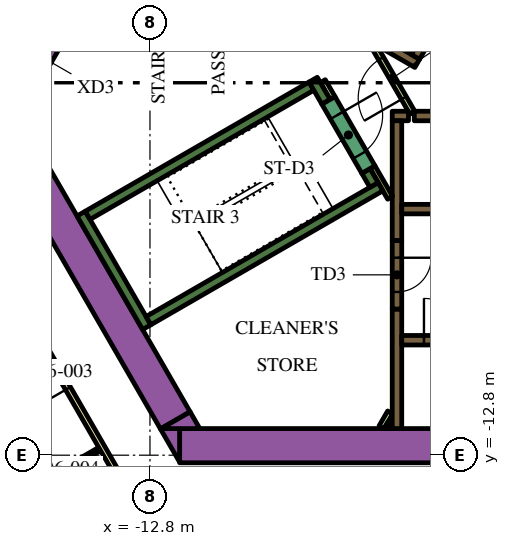
"""IFC4 building model, lengths in metres.
Left out: names, types, materials, properties, quantities, classifications, styles, units other than length and angle.
Written with IfcOpenShell. Run it as: python <this file> out.ifc"""

import sys

from ifc_helpers import new_model, si_unit, direction, frame, frame_2d, origin, place, context, subcontext, project, spatial, polyline, rectangle, outline, extrude, element, fill, save


model = new_model("IFC4")
c1 = context("Model", 3, precision=1e-05, world=origin(), true_north=direction((0.0, 1.0)))
c2 = subcontext(c1, "Body", "Model", "MODEL_VIEW")
j1 = project(units=[si_unit("LENGTHUNIT", "METRE"), si_unit("PLANEANGLEUNIT", "RADIAN")], contexts=[c1])
p1 = place(None, origin())
s1 = spatial("IfcSite", under=j1, at=p1, CompositionType="ELEMENT")
p2 = place(p1, origin())
s2 = spatial("IfcBuilding", under=s1, at=p2, CompositionType="ELEMENT")
p3 = place(p2, frame((0.0, 0.0, 87.6)))
s3 = spatial("IfcBuildingStorey", under=s2, at=p3, CompositionType="ELEMENT", Elevation=87.6)
p4 = place(p3, frame((-12.019, -12.55, 0.0), z_axis=(0.0, 0.0, 1.0), x_axis=(1.0, 0.0, 0.0)))
e1 = element("IfcWall", 1, at=p4, inside=s3, PredefinedType="SOLIDWALL", context=c2, shape_type="SweptSolid", body=[
    extrude(rectangle(XDim=21.63, YDim=0.9, at=frame_2d((10.815, 0.0))), origin(), (0.0, 0.0, 1.0), 3.9),
])
p5 = place(p3, origin())
e2 = element("IfcWall", 2, at=p5, inside=s3, PredefinedType="SOLIDWALL", context=c2, shape_type="SweptSolid", body=[
    extrude(outline(polyline([(-12.529, -12.1), (-12.021, -12.1), (-12.021, -12.98), (-12.529, -12.1)])), origin(), (0.0, 0.0, 1.0), 3.9),
])
p6 = place(p3, frame((-12.134, -11.883, 0.0), z_axis=(0.0, 0.0, 1.0), x_axis=(-0.500005339912, 0.866022320763, 0.0)))
e3 = element("IfcWall", 3, at=p6, inside=s3, PredefinedType="SOLIDWALL", context=c2, shape_type="SweptSolid", body=[
    extrude(rectangle(XDim=9.488, YDim=0.9, at=frame_2d((4.744, 0.0))), origin(), (0.0, 0.0, 1.0), 3.9),
])
e4 = element("IfcWall", 4, at=p5, inside=s3, PredefinedType="SOLIDWALL", context=c2, shape_type="SweptSolid", body=[
    extrude(outline(polyline([(-11.489, -12.1), (-12.505, -12.1), (-11.743, -11.66), (-11.489, -12.1)])), origin(), (0.0, 0.0, 1.0), 3.9),
])
p7 = place(p3, frame((-12.885, -9.431, 0.0), z_axis=(0.0, 0.0, 1.0), x_axis=(-0.500020560727, 0.866013532718, 0.0)))
e5 = element("IfcWall", 5, at=p7, inside=s3, PredefinedType="SOLIDWALL", context=c2, shape_type="SweptSolid", body=[
    extrude(rectangle(XDim=3.45, YDim=0.25, at=frame_2d((1.725, 0.0))), origin(), (0.0, 0.0, 1.0), 3.9),
])
p8 = place(p3, frame((-14.44, -6.49, 0.0), z_axis=(0.0, 0.0, 1.0), x_axis=(0.866022966069, 0.500004222222, 0.0)))
e6 = element("IfcWall", 6, at=p8, inside=s3, PredefinedType="SOLIDWALL", context=c2, shape_type="SweptSolid", body=[
    extrude(rectangle(XDim=6.8, YDim=0.25, at=frame_2d((3.4, 0.0))), origin(), (0.0, 0.0, 1.0), 3.9),
])
p9 = place(p3, frame((-8.168, -3.503, 0.0), z_axis=(0.0, 0.0, 1.0), x_axis=(-0.499952099219, 0.866053057547, 0.0)))
e7 = element("IfcWall", 7, at=p9, inside=s3, PredefinedType="SOLIDWALL", context=c2, shape_type="SweptSolid", body=[
    extrude(rectangle(XDim=0.675, YDim=0.25, at=frame_2d((0.337, 0.0))), origin(), (0.0, 0.0, 1.0), 3.9),
])
p10 = place(p3, frame((-12.84, -9.261, 0.0), z_axis=(0.0, 0.0, 1.0), x_axis=(0.866016039709, 0.500016218704, 0.0)))
e8 = element("IfcWall", 8, at=p10, inside=s3, PredefinedType="SOLIDWALL", context=c2, shape_type="SweptSolid", body=[
    extrude(rectangle(XDim=7.05, YDim=0.25, at=frame_2d((3.525, 0.0))), origin(), (0.0, 0.0, 1.0), 3.9),
])
p11 = place(p3, frame((-6.905, -5.69, 0.0), z_axis=(0.0, 0.0, 1.0), x_axis=(-0.500402024738, 0.865793170242, 0.0)))
e9 = element("IfcWall", 9, at=p11, inside=s3, PredefinedType="SOLIDWALL", context=c2, shape_type="SweptSolid", body=[
    extrude(rectangle(XDim=0.425, YDim=0.25, at=frame_2d((0.212, 0.0))), origin(), (0.0, 0.0, 1.0), 3.9),
])
p12 = place(p3, frame((-6.3, -12.1, 0.0), z_axis=(0.0, 0.0, 1.0), x_axis=(0.0, 1.0, 0.0)))
e10 = element("IfcWall", 10, at=p12, inside=s3, PredefinedType="SOLIDWALL", context=c2, shape_type="SweptSolid", body=[
    extrude(rectangle(XDim=3.146, YDim=0.25, at=frame_2d((1.573, 0.0))), origin(), (0.0, 0.0, 1.0), 3.9),
])
p13 = place(p3, frame((-5.845, -3.875, 0.0), z_axis=(0.0, 0.0, 1.0), x_axis=(1.0, 0.0, 0.0)))
e11 = element("IfcWall", 11, at=p13, inside=s3, PredefinedType="SOLIDWALL", context=c2, shape_type="SweptSolid", body=[
    extrude(rectangle(XDim=12.27, YDim=0.25, at=frame_2d((6.135, 0.0))), origin(), (0.0, 0.0, 1.0), 3.9),
])
p14 = place(p3, frame((-6.425, -3.875, 0.0), z_axis=(0.0, 0.0, 1.0), x_axis=(1.0, 0.0, 0.0)))
e12 = element("IfcWall", 12, at=p14, inside=s3, PredefinedType="SOLIDWALL", context=c2, shape_type="SweptSolid", body=[
    extrude(rectangle(XDim=0.428, YDim=0.25, at=frame_2d((0.214, 0.0))), origin(), (0.0, 0.0, 1.0), 3.9),
])
p15 = place(p3, frame((-6.3, -4.0, 0.0), z_axis=(0.0, 0.0, 1.0), x_axis=(0.0, -1.0, 0.0)))
e13 = element("IfcWall", 13, at=p15, inside=s3, PredefinedType="SOLIDWALL", context=c2, shape_type="SweptSolid", body=[
    extrude(rectangle(XDim=3.154, YDim=0.25, at=frame_2d((1.577, 0.0))), origin(), (0.0, 0.0, 1.0), 3.9),
])
e14 = element("IfcWall", 14, at=p5, inside=s3, PredefinedType="SOLIDWALL", context=c2, shape_type="SweptSolid", body=[
    extrude(outline(polyline([(-5.922, -2.257), (-5.922, -2.257), (-5.705, -2.382), (-5.83, -2.598), (-6.829, -2.021), (-6.88, -1.934), (-6.88, -1.934), (-6.93, -1.963), (-7.952, -1.373), (-7.827, -1.156), (-5.922, -2.257)])), origin(), (0.0, 0.0, 1.0), 3.9),
])
p16 = place(p3, frame((-6.708, -12.068, 0.0), z_axis=(0.0, 0.0, 1.0), x_axis=(0.500000789788, 0.8660249478, 0.0)))
e15 = element("IfcWall", 15, at=p16, inside=s3, PredefinedType="PARTITIONING", context=c2, shape_type="SweptSolid", body=[
    extrude(rectangle(XDim=0.456, YDim=0.15, at=frame_2d((0.228, 0.0))), origin(), (0.0, 0.0, 1.0), 2.75),
])
p17 = place(p3, frame((-6.534, -12.068, 0.0), z_axis=(0.0, 0.0, 1.0), x_axis=(0.500240224089, 0.865886665912, 0.0)))
e16 = element("IfcWall", 16, at=p17, inside=s3, PredefinedType="PARTITIONING", context=c2, shape_type="SweptSolid", body=[
    extrude(rectangle(XDim=0.109, YDim=0.15, at=frame_2d((0.054, 0.0))), origin(), (0.0, 0.0, 1.0), 2.75),
])
p18 = place(p3, frame((-6.48, -6.027, 0.0), z_axis=(0.0, 0.0, 1.0), x_axis=(-0.499927229454, 0.866067413802, 0.0)))
e17 = element("IfcWall", 17, at=p18, inside=s3, PredefinedType="PARTITIONING", context=c2, shape_type="SweptSolid", body=[
    extrude(rectangle(XDim=0.929, YDim=0.15, at=frame_2d((0.464, 0.0))), origin(), (0.0, 0.0, 1.0), 3.9),
])
p19 = place(p3, frame((-8.252, -2.958, 0.0), z_axis=(0.0, 0.0, 1.0), x_axis=(0.500174715838, -0.865924508047, 0.0)))
e18 = element("IfcWall", 18, at=p19, inside=s3, PredefinedType="PARTITIONING", context=c2, shape_type="SweptSolid", body=[
    extrude(rectangle(XDim=0.514, YDim=0.15, at=frame_2d((0.257, 0.0))), origin(), (0.0, 0.0, 1.0), 2.75),
])
p20 = place(p3, frame((-6.175, -9.775, 0.0), z_axis=(0.0, 0.0, 1.0), x_axis=(1.0, 0.0, 0.0)))
e19 = element("IfcWall", 19, at=p20, inside=s3, PredefinedType="SOLIDWALL", context=c2, shape_type="SweptSolid", body=[
    extrude(rectangle(XDim=12.35, YDim=0.25, at=frame_2d((6.175, 0.0))), origin(), (0.0, 0.0, 1.0), 3.9),
])
p21 = place(p20, frame((0.585, 0.0, 0.0)))
e20 = element("IfcOpeningElement", 20, at=p21, cuts=e19, PredefinedType="OPENING", context=c2, shape_type="SweptSolid", body=[
    extrude(rectangle(XDim=1.1, YDim=2.1, at=frame_2d((0.55, 1.05))), frame((0.0, 0.135, 0.0), z_axis=(0.0, -1.0, 0.0), x_axis=(1.0, 0.0, 0.0)), (0.0, 0.0, 1.0), 0.27),
])
p22 = place(p20, frame((3.105, 0.0, 0.0)))
e21 = element("IfcOpeningElement", 21, at=p22, cuts=e19, PredefinedType="OPENING", context=c2, shape_type="SweptSolid", body=[
    extrude(rectangle(XDim=1.1, YDim=2.1, at=frame_2d((0.55, 1.05))), frame((0.0, 0.135, 0.0), z_axis=(0.0, -1.0, 0.0), x_axis=(1.0, 0.0, 0.0)), (0.0, 0.0, 1.0), 0.27),
])
p23 = place(p20, frame((5.625, 0.0, 0.0)))
e22 = element("IfcOpeningElement", 22, at=p23, cuts=e19, PredefinedType="OPENING", context=c2, shape_type="SweptSolid", body=[
    extrude(rectangle(XDim=1.1, YDim=2.1, at=frame_2d((0.55, 1.05))), frame((0.0, 0.135, 0.0), z_axis=(0.0, -1.0, 0.0), x_axis=(1.0, 0.0, 0.0)), (0.0, 0.0, 1.0), 0.27),
])
p24 = place(p20, frame((8.145, 0.0, 0.0)))
e23 = element("IfcOpeningElement", 23, at=p24, cuts=e19, PredefinedType="OPENING", context=c2, shape_type="SweptSolid", body=[
    extrude(rectangle(XDim=1.1, YDim=2.1, at=frame_2d((0.55, 1.05))), frame((0.0, 0.135, 0.0), z_axis=(0.0, -1.0, 0.0), x_axis=(1.0, 0.0, 0.0)), (0.0, 0.0, 1.0), 0.27),
])
p25 = place(p20, frame((10.665, 0.0, 0.0)))
e24 = element("IfcOpeningElement", 24, at=p25, cuts=e19, PredefinedType="OPENING", context=c2, shape_type="SweptSolid", body=[
    extrude(rectangle(XDim=1.1, YDim=2.1, at=frame_2d((0.55, 1.05))), frame((0.0, 0.135, 0.0), z_axis=(0.0, -1.0, 0.0), x_axis=(1.0, 0.0, 0.0)), (0.0, 0.0, 1.0), 0.27),
])
p26 = place(p3, frame((-6.175, -6.325, 0.0), z_axis=(0.0, 0.0, 1.0), x_axis=(1.0, 0.0, 0.0)))
e25 = element("IfcWall", 25, at=p26, inside=s3, PredefinedType="SOLIDWALL", context=c2, shape_type="SweptSolid", body=[
    extrude(rectangle(XDim=12.35, YDim=0.25, at=frame_2d((6.175, 0.0))), origin(), (0.0, 0.0, 1.0), 3.9),
])
p27 = place(p26, frame((3.205, 0.0, 0.0)))
e26 = element("IfcOpeningElement", 26, at=p27, cuts=e25, PredefinedType="OPENING", context=c2, shape_type="SweptSolid", body=[
    extrude(rectangle(XDim=0.9, YDim=2.1, at=frame_2d((0.45, 1.05))), frame((0.0, 0.135, 0.0), z_axis=(0.0, -1.0, 0.0), x_axis=(1.0, 0.0, 0.0)), (0.0, 0.0, 1.0), 0.27),
])
p28 = place(p26, frame((8.145, 0.0, 0.0)))
e27 = element("IfcOpeningElement", 27, at=p28, cuts=e25, PredefinedType="OPENING", context=c2, shape_type="SweptSolid", body=[
    extrude(rectangle(XDim=1.1, YDim=2.1, at=frame_2d((0.55, 1.05))), frame((0.0, 0.135, 0.0), z_axis=(0.0, -1.0, 0.0), x_axis=(1.0, 0.0, 0.0)), (0.0, 0.0, 1.0), 0.27),
])
p29 = place(p26, frame((10.665, 0.0, 0.0)))
e28 = element("IfcOpeningElement", 28, at=p29, cuts=e25, PredefinedType="OPENING", context=c2, shape_type="SweptSolid", body=[
    extrude(rectangle(XDim=1.1, YDim=2.1, at=frame_2d((0.55, 1.05))), frame((0.0, 0.135, 0.0), z_axis=(0.0, -1.0, 0.0), x_axis=(1.0, 0.0, 0.0)), (0.0, 0.0, 1.0), 0.27),
])
p30 = place(p3, frame((-0.898, 6.194, 0.0), z_axis=(0.0, 0.0, 1.0), x_axis=(-0.499996202215, -0.866027596426, 0.0)))
e29 = element("IfcWall", 29, at=p30, inside=s3, PredefinedType="SOLIDWALL", context=c2, shape_type="SweptSolid", body=[
    extrude(rectangle(XDim=9.83, YDim=0.25, at=frame_2d((4.915, 0.0))), origin(), (0.0, 0.0, 1.0), 3.9),
])
p31 = place(p30, frame((0.585, 0.0, 0.0)))
e30 = element("IfcOpeningElement", 30, at=p31, cuts=e29, PredefinedType="OPENING", context=c2, shape_type="SweptSolid", body=[
    extrude(rectangle(XDim=1.1, YDim=2.1, at=frame_2d((0.55, 1.05))), frame((0.0, 0.135, 0.0), z_axis=(0.0, -1.0, 0.0), x_axis=(1.0, 0.0, 0.0)), (0.0, 0.0, 1.0), 0.27),
])
p32 = place(p30, frame((3.105, 0.0, 0.0)))
e31 = element("IfcOpeningElement", 31, at=p32, cuts=e29, PredefinedType="OPENING", context=c2, shape_type="SweptSolid", body=[
    extrude(rectangle(XDim=1.1, YDim=2.1, at=frame_2d((0.55, 1.05))), frame((0.0, 0.135, 0.0), z_axis=(0.0, -1.0, 0.0), x_axis=(1.0, 0.0, 0.0)), (0.0, 0.0, 1.0), 0.27),
])
p33 = place(p30, frame((5.625, 0.0, 0.0)))
e32 = element("IfcOpeningElement", 32, at=p33, cuts=e29, PredefinedType="OPENING", context=c2, shape_type="SweptSolid", body=[
    extrude(rectangle(XDim=1.1, YDim=2.1, at=frame_2d((0.55, 1.05))), frame((0.0, 0.135, 0.0), z_axis=(0.0, -1.0, 0.0), x_axis=(1.0, 0.0, 0.0)), (0.0, 0.0, 1.0), 0.27),
])
p34 = place(p30, frame((8.145, 0.0, 0.0)))
e33 = element("IfcOpeningElement", 33, at=p34, cuts=e29, PredefinedType="OPENING", context=c2, shape_type="SweptSolid", body=[
    extrude(rectangle(XDim=1.1, YDim=2.1, at=frame_2d((0.55, 1.05))), frame((0.0, 0.135, 0.0), z_axis=(0.0, -1.0, 0.0), x_axis=(1.0, 0.0, 0.0)), (0.0, 0.0, 1.0), 0.27),
])
p35 = place(p3, frame((-8.103, -3.466, 0.0), z_axis=(0.0, 0.0, 1.0), x_axis=(0.500078061341, -0.865980330357, 0.0)))
e34 = element("IfcWall", 34, at=p35, inside=s3, PredefinedType="SOLIDWALL", context=c2, shape_type="SweptSolid", body=[
    extrude(rectangle(XDim=2.1, YDim=0.4, at=frame_2d((1.05, 0.0))), origin(), (0.0, 0.0, 1.0), 3.9),
])
p36 = place(p35, frame((0.45, 0.0, 0.0)))
e35 = element("IfcOpeningElement", 35, at=p36, cuts=e34, PredefinedType="OPENING", context=c2, shape_type="SweptSolid", body=[
    extrude(rectangle(XDim=1.2, YDim=2.1, at=frame_2d((0.6, 1.05))), frame((0.0, 0.21, 0.0), z_axis=(0.0, -1.0, 0.0), x_axis=(1.0, 0.0, 0.0)), (0.0, 0.0, 1.0), 0.42),
])
p37 = place(p3, frame((-6.3, -7.154, 0.0), z_axis=(0.0, 0.0, 1.0), x_axis=(0.0, -1.0, 0.0)))
e36 = element("IfcWall", 36, at=p37, inside=s3, PredefinedType="SOLIDWALL", context=c2, shape_type="SweptSolid", body=[
    extrude(rectangle(XDim=1.8, YDim=0.25, at=frame_2d((0.9, 0.0))), origin(), (0.0, 0.0, 1.0), 3.9),
])
p38 = place(p37, frame((0.45, 0.0, 0.0)))
e37 = element("IfcOpeningElement", 37, at=p38, cuts=e36, PredefinedType="OPENING", context=c2, shape_type="SweptSolid", body=[
    extrude(rectangle(XDim=0.9, YDim=2.1, at=frame_2d((0.45, 1.05))), frame((0.0, 0.135, 0.0), z_axis=(0.0, -1.0, 0.0), x_axis=(1.0, 0.0, 0.0)), (0.0, 0.0, 1.0), 0.27),
])
p39 = place(p3, frame((-5.895, -3.79, 0.0), z_axis=(0.0, 0.0, 1.0), x_axis=(-0.49994051562, 0.866059744384, 0.0)))
e38 = element("IfcWall", 38, at=p39, inside=s3, PredefinedType="PARTITIONING", context=c2, shape_type="SweptSolid", body=[
    extrude(rectangle(XDim=2.1, YDim=0.15, at=frame_2d((1.05, 0.0))), origin(), (0.0, 0.0, 1.0), 2.75),
])
p40 = place(p39, frame((0.45, 0.0, 0.0)))
e39 = element("IfcOpeningElement", 39, at=p40, cuts=e38, PredefinedType="OPENING", context=c2, shape_type="SweptSolid", body=[
    extrude(rectangle(XDim=1.2, YDim=2.1, at=frame_2d((0.6, 1.05))), frame((0.0, 0.085, 0.0), z_axis=(0.0, -1.0, 0.0), x_axis=(1.0, 0.0, 0.0)), (0.0, 0.0, 1.0), 0.17),
])
p41 = place(p3, frame((-16.209, -2.976, 0.0), z_axis=(0.0, 0.0, 1.0), x_axis=(0.499954529098, 0.86605165483, 0.0)))
e40 = element("IfcWall", 40, at=p41, inside=s3, PredefinedType="SOLIDWALL", context=c2, shape_type="SweptSolid", body=[
    extrude(rectangle(XDim=1.7, YDim=0.9, at=frame_2d((0.85, 0.0))), origin(), (0.0, 0.0, 1.0), 3.9),
])
p42 = place(p41, frame((0.25, 0.0, 0.0)))
e41 = element("IfcOpeningElement", 41, at=p42, cuts=e40, PredefinedType="OPENING", context=c2, shape_type="SweptSolid", body=[
    extrude(rectangle(XDim=1.2, YDim=2.1, at=frame_2d((0.6, 1.05))), frame((0.0, 0.46, 0.0), z_axis=(0.0, -1.0, 0.0), x_axis=(1.0, 0.0, 0.0)), (0.0, 0.0, 1.0), 0.92),
])
p43 = place(p3, frame((-19.081, -3.9, 0.0), z_axis=(0.0, 0.0, 1.0), x_axis=(0.499998313975, 0.866026377209, 0.0)))
e42 = element("IfcWall", 42, at=p43, inside=s3, PredefinedType="PARTITIONING", context=c2, shape_type="SweptSolid", body=[
    extrude(rectangle(XDim=25.766, YDim=0.15, at=frame_2d((12.883, 0.0))), origin(), (0.0, 0.0, 1.0), 2.75),
])
p44 = place(p43, frame((19.306, 0.0, 0.0)))
e43 = element("IfcOpeningElement", 43, at=p44, cuts=e42, PredefinedType="OPENING", context=c2, shape_type="SweptSolid", body=[
    extrude(rectangle(XDim=1.0, YDim=2.1, at=frame_2d((0.5, 1.05))), frame((0.0, 0.085, 0.0), z_axis=(0.0, -1.0, 0.0), x_axis=(1.0, 0.0, 0.0)), (0.0, 0.0, 1.0), 0.17),
])
p45 = place(p43, frame((18.0, 0.0, 0.0)))
e44 = element("IfcOpeningElement", 44, at=p45, cuts=e42, PredefinedType="OPENING", context=c2, shape_type="SweptSolid", body=[
    extrude(rectangle(XDim=1.0, YDim=2.1, at=frame_2d((0.5, 1.05))), frame((0.0, 0.085, 0.0), z_axis=(0.0, -1.0, 0.0), x_axis=(1.0, 0.0, 0.0)), (0.0, 0.0, 1.0), 0.17),
])
p46 = place(p43, frame((10.874, 0.0, 0.0)))
e45 = element("IfcOpeningElement", 45, at=p46, cuts=e42, PredefinedType="OPENING", context=c2, shape_type="SweptSolid", body=[
    extrude(rectangle(XDim=0.9, YDim=2.1, at=frame_2d((0.45, 1.05))), frame((0.0, 0.085, 0.0), z_axis=(0.0, -1.0, 0.0), x_axis=(1.0, 0.0, 0.0)), (0.0, 0.0, 1.0), 0.17),
])
p47 = place(p43, frame((8.548, 0.0, 0.0)))
e46 = element("IfcOpeningElement", 46, at=p47, cuts=e42, PredefinedType="OPENING", context=c2, shape_type="SweptSolid", body=[
    extrude(rectangle(XDim=1.1, YDim=2.1, at=frame_2d((0.55, 1.05))), frame((0.0, 0.085, 0.0), z_axis=(0.0, -1.0, 0.0), x_axis=(1.0, 0.0, 0.0)), (0.0, 0.0, 1.0), 0.17),
])
p48 = place(p43, frame((0.18, 0.0, 0.0)))
e47 = element("IfcOpeningElement", 47, at=p48, cuts=e42, PredefinedType="OPENING", context=c2, shape_type="SweptSolid", body=[
    extrude(rectangle(XDim=1.0, YDim=2.1, at=frame_2d((0.5, 1.05))), frame((0.0, 0.085, 0.0), z_axis=(0.0, -1.0, 0.0), x_axis=(1.0, 0.0, 0.0)), (0.0, 0.0, 1.0), 0.17),
])
p49 = place(p3, frame((-12.918, -14.575, 0.0), z_axis=(0.0, 0.0, 1.0), x_axis=(-0.500009150678, 0.866020120573, 0.0)))
e48 = element("IfcWall", 48, at=p49, inside=s3, PredefinedType="PARTITIONING", context=c2, shape_type="SweptSolid", body=[
    extrude(rectangle(XDim=5.258, YDim=0.15, at=frame_2d((2.629, 0.0))), origin(), (0.0, 0.0, 1.0), 2.75),
])
p50 = place(p49, frame((4.078, 0.0, 0.0)))
e49 = element("IfcOpeningElement", 49, at=p50, cuts=e48, PredefinedType="OPENING", context=c2, shape_type="SweptSolid", body=[
    extrude(rectangle(XDim=1.0, YDim=2.1, at=frame_2d((0.5, 1.05))), frame((0.0, 0.085, 0.0), z_axis=(0.0, -1.0, 0.0), x_axis=(1.0, 0.0, 0.0)), (0.0, 0.0, 1.0), 0.17),
])
p51 = place(p3, frame((-14.123, -12.638, 0.0), z_axis=(0.0, 0.0, 1.0), x_axis=(-0.86599734893, -0.500048589285, 0.0)))
e50 = element("IfcWall", 50, at=p51, inside=s3, PredefinedType="PARTITIONING", context=c2, shape_type="SweptSolid", body=[
    extrude(rectangle(XDim=2.7, YDim=0.1, at=frame_2d((1.35, 0.0))), origin(), (0.0, 0.0, 1.0), 2.75),
])
p52 = place(p51, frame((0.6, 0.0, 0.0)))
e51 = element("IfcOpeningElement", 51, at=p52, cuts=e50, PredefinedType="OPENING", context=c2, shape_type="SweptSolid", body=[
    extrude(rectangle(XDim=0.9, YDim=2.1, at=frame_2d((0.45, 1.05))), frame((0.0, 0.06, 0.0), z_axis=(0.0, -1.0, 0.0), x_axis=(1.0, 0.0, 0.0)), (0.0, 0.0, 1.0), 0.12),
])
p53 = place(p21, origin())
e52 = element("IfcDoor", 52, at=p53, inside=s3, OperationType="DOUBLE_DOOR_SLIDING", PredefinedType="DOOR", context=c2, shape_type="SweptSolid", body=[
    extrude(rectangle(XDim=1.1, YDim=2.1, at=frame_2d((0.55, 1.05))), frame((0.0, 0.025, 0.0), z_axis=(0.0, -1.0, 0.0), x_axis=(1.0, 0.0, 0.0)), (0.0, 0.0, 1.0), 0.05),
])
fill(e20, e52)
p54 = place(p36, origin())
e53 = element("IfcDoor", 53, at=p54, inside=s3, OperationType="SINGLE_SWING_LEFT", PredefinedType="DOOR", context=c2, shape_type="SweptSolid", body=[
    extrude(rectangle(XDim=1.2, YDim=2.1, at=frame_2d((0.6, 1.05))), frame((0.0, 0.025, 0.0), z_axis=(0.0, -1.0, 0.0), x_axis=(1.0, 0.0, 0.0)), (0.0, 0.0, 1.0), 0.05),
])
fill(e35, e53)
p55 = place(p38, origin())
e54 = element("IfcDoor", 54, at=p55, inside=s3, OperationType="SINGLE_SWING_LEFT", PredefinedType="DOOR", context=c2, shape_type="SweptSolid", body=[
    extrude(rectangle(XDim=0.9, YDim=2.1, at=frame_2d((0.45, 1.05))), frame((0.0, 0.025, 0.0), z_axis=(0.0, -1.0, 0.0), x_axis=(1.0, 0.0, 0.0)), (0.0, 0.0, 1.0), 0.05),
])
fill(e37, e54)
p56 = place(p40, origin())
e55 = element("IfcDoor", 55, at=p56, inside=s3, OperationType="SINGLE_SWING_LEFT", PredefinedType="DOOR", context=c2, shape_type="SweptSolid", body=[
    extrude(rectangle(XDim=1.2, YDim=2.1, at=frame_2d((0.6, 1.05))), frame((0.0, 0.025, 0.0), z_axis=(0.0, -1.0, 0.0), x_axis=(1.0, 0.0, 0.0)), (0.0, 0.0, 1.0), 0.05),
])
fill(e39, e55)
p57 = place(p50, origin())
e56 = element("IfcDoor", 56, at=p57, inside=s3, OperationType="SINGLE_SWING_RIGHT", PredefinedType="DOOR", context=c2, shape_type="SweptSolid", body=[
    extrude(rectangle(XDim=1.0, YDim=2.1, at=frame_2d((0.5, 1.05))), frame((0.0, 0.025, 0.0), z_axis=(0.0, -1.0, 0.0), x_axis=(1.0, 0.0, 0.0)), (0.0, 0.0, 1.0), 0.05),
])
fill(e49, e56)
p58 = place(p52, origin())
e57 = element("IfcDoor", 57, at=p58, inside=s3, OperationType="SINGLE_SWING_LEFT", PredefinedType="DOOR", context=c2, shape_type="SweptSolid", body=[
    extrude(rectangle(XDim=0.9, YDim=2.1, at=frame_2d((0.45, 1.05))), frame((0.0, 0.025, 0.0), z_axis=(0.0, -1.0, 0.0), x_axis=(1.0, 0.0, 0.0)), (0.0, 0.0, 1.0), 0.05),
])
fill(e51, e57)
save(model, sys.argv[1])
